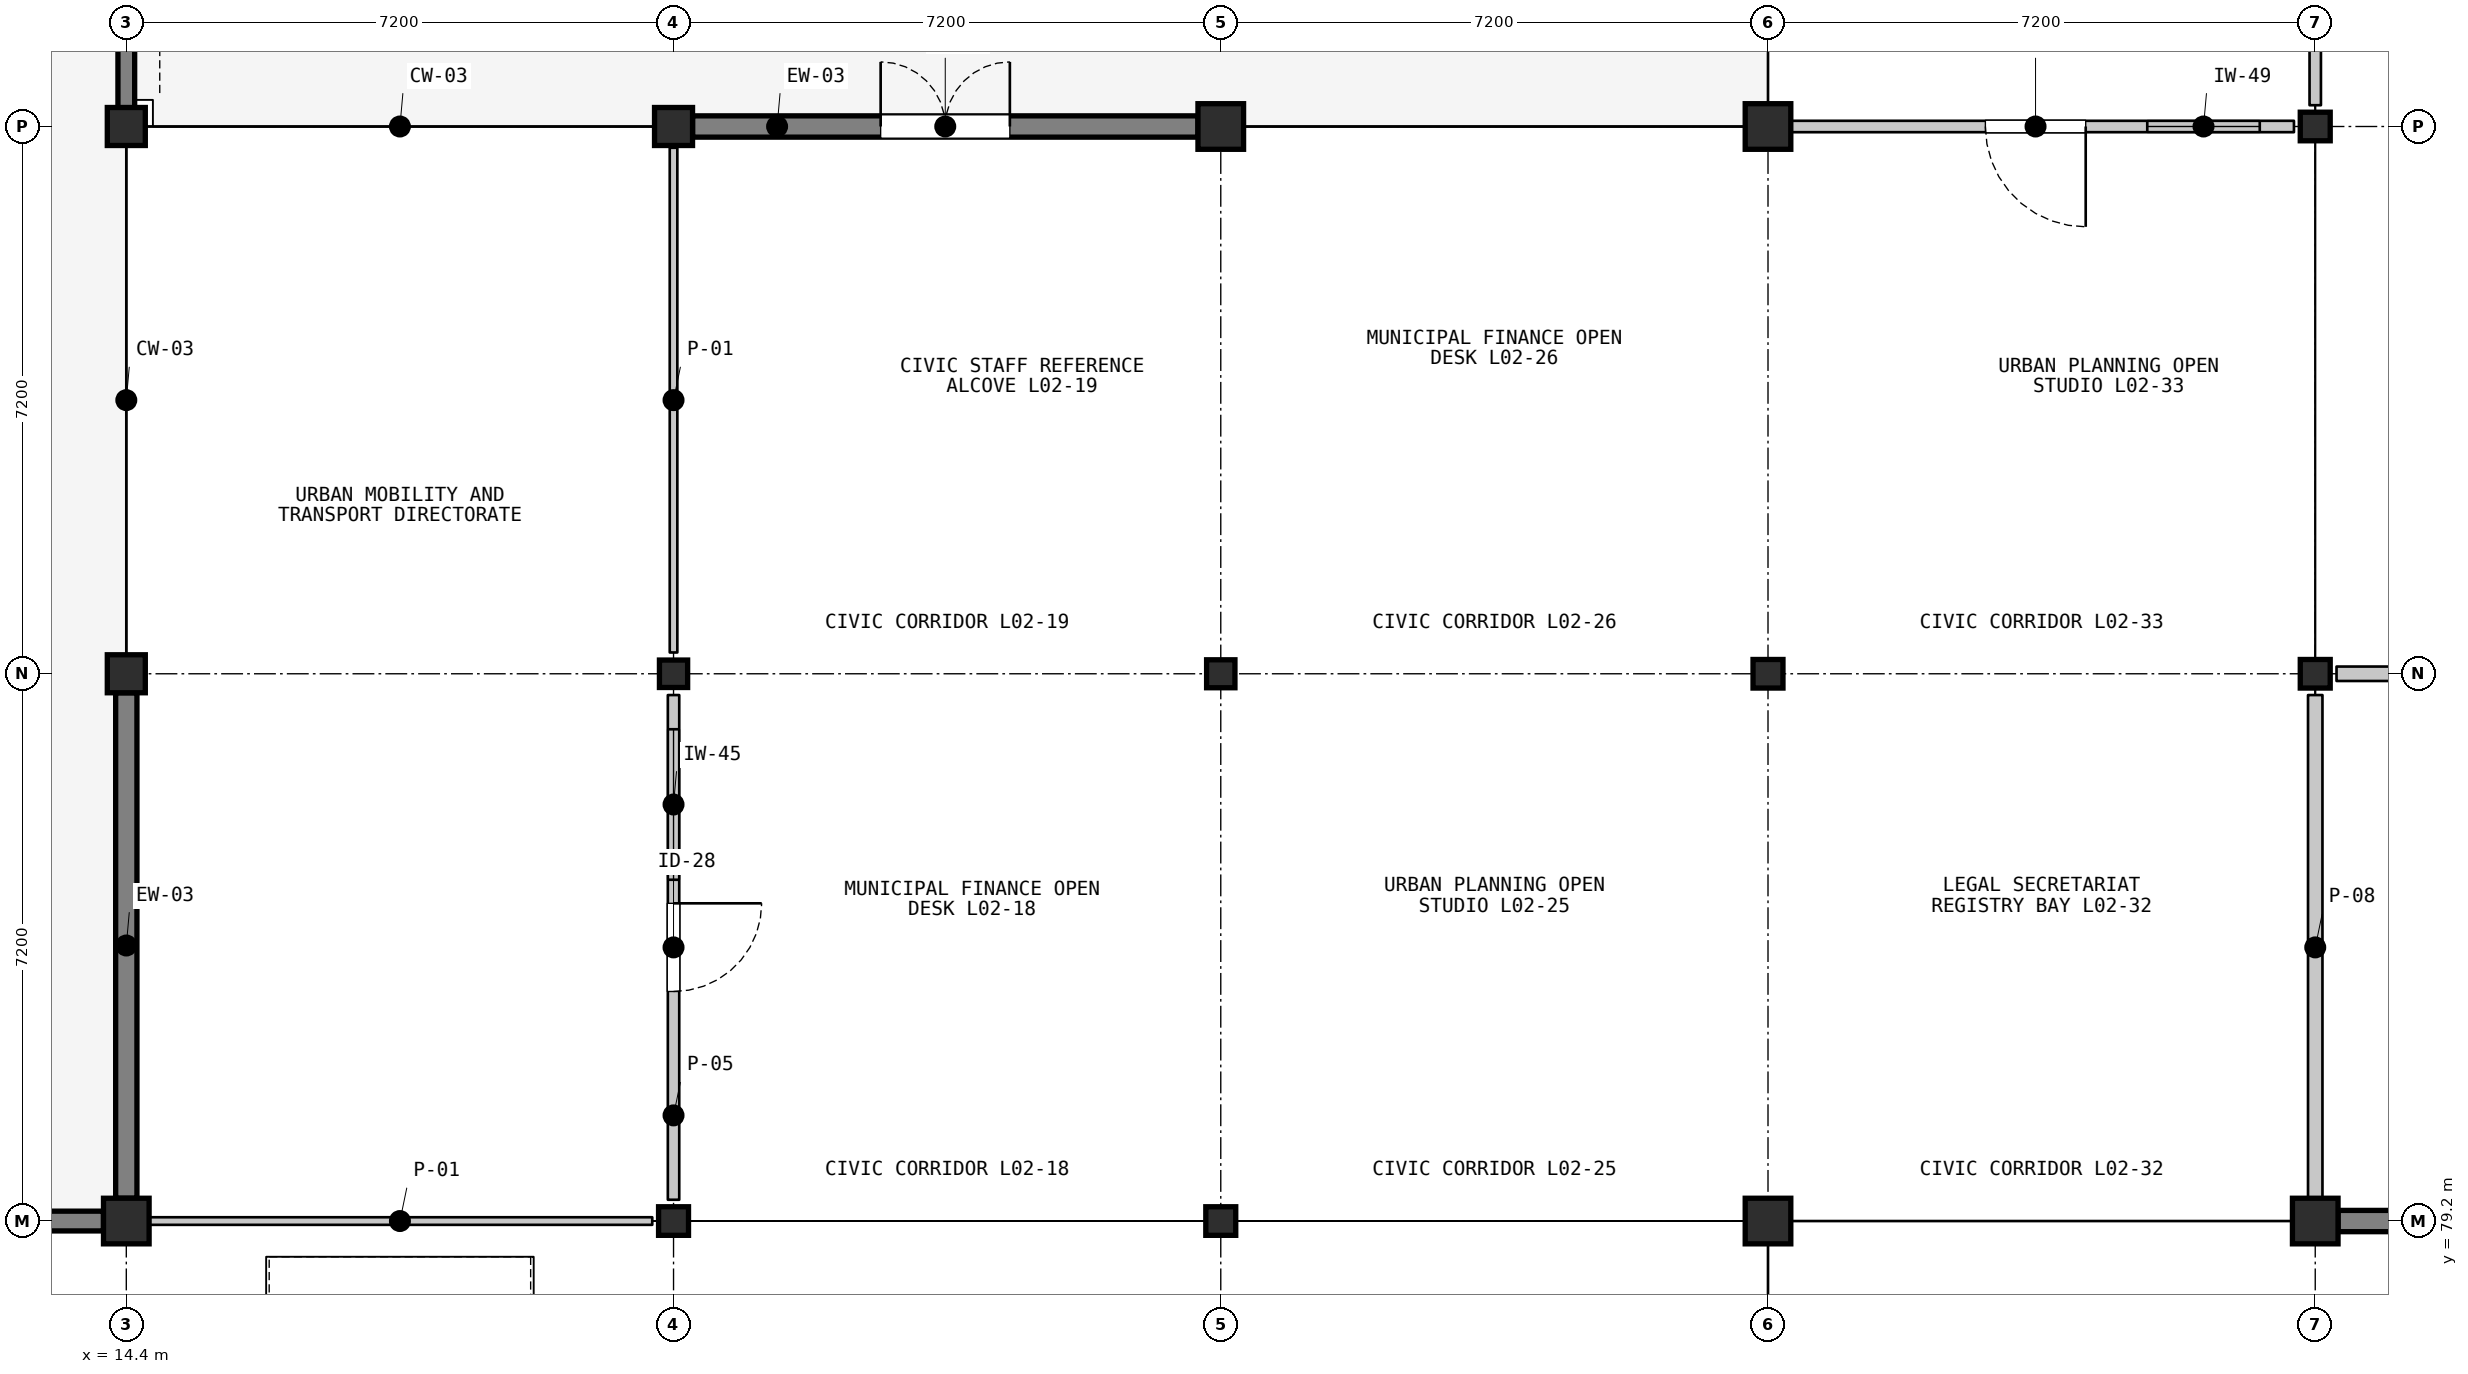
"""IFC4 building model, lengths in metres.
Left out: names, types, materials, properties, quantities, classifications, styles, units other than length and angle.
Written with IfcOpenShell. Run it as: python <this file> out.ifc"""

import sys

from ifc_helpers import new_model, si_unit, direction, frame, frame_2d, origin, origin_2d, place, context, subcontext, project, spatial, rectangle, i_section, extrude, element, fill, save


model = new_model("IFC4")
c1 = context("Model", 3, precision=1e-05, world=origin(), true_north=direction((0.0, 1.0)))
c2 = subcontext(c1, "Body", "Model", "MODEL_VIEW")
j1 = project(units=[si_unit("LENGTHUNIT", "METRE"), si_unit("PLANEANGLEUNIT", "RADIAN")], contexts=[c1])
p1 = place(None, origin())
s1 = spatial("IfcSite", under=j1, at=p1, CompositionType="ELEMENT")
p2 = place(p1, origin())
s2 = spatial("IfcBuilding", under=s1, at=p2, CompositionType="ELEMENT")
p3 = place(p2, frame((0.0, 0.0, 5.4)))
s3 = spatial("IfcBuildingStorey", under=s2, at=p3, CompositionType="ELEMENT", Elevation=5.4)
p4 = place(p3, frame((14.4, 79.2, 0.0), z_axis=(0.0, 0.0, 1.0), x_axis=(1.0, 0.0, 0.0)))
e1 = element("IfcColumn", 1, at=p4, inside=s3, PredefinedType="COLUMN", context=c2, shape_type="SweptSolid", body=[
    extrude(rectangle(XDim=0.6, YDim=0.6, at=origin_2d()), origin(), (0.0, 0.0, 1.0), 4.5),
])
for number, where, z_axis, x_axis in (
    (2, (14.4, 86.4, 0.0), (0.0, 0.0, 1.0), (1.0, 0.0, 0.0)),
    (3, (14.4, 93.6, 0.0), (0.0, 0.0, 1.0), (1.0, 0.0, 0.0)),
):
    element("IfcColumn", number, at=place(p3, frame(where, z_axis=z_axis, x_axis=x_axis)), inside=s3, PredefinedType="COLUMN", context=c2, shape_type="SweptSolid", body=[
        extrude(rectangle(XDim=0.5, YDim=0.5, at=origin_2d()), origin(), (0.0, 0.0, 1.0), 4.5),
    ])
p5 = place(p3, frame((21.6, 79.2, 0.0), z_axis=(0.0, 0.0, 1.0), x_axis=(1.0, 0.0, 0.0)))
e4 = element("IfcColumn", 4, at=p5, inside=s3, PredefinedType="COLUMN", context=c2, shape_type="SweptSolid", body=[
    extrude(i_section(OverallWidth=0.394, OverallDepth=0.376, WebThickness=0.017, FlangeThickness=0.028, FilletRadius=0.015, at=origin_2d()), origin(), (0.0, 0.0, 1.0), 4.5),
])
p6 = place(p3, frame((21.6, 86.4, 0.0), z_axis=(0.0, 0.0, 1.0), x_axis=(1.0, 0.0, 0.0)))
e5 = element("IfcColumn", 5, at=p6, inside=s3, PredefinedType="COLUMN", context=c2, shape_type="SweptSolid", body=[
    extrude(i_section(OverallWidth=0.371, OverallDepth=0.361, WebThickness=0.012, FlangeThickness=0.02, FilletRadius=0.015, at=origin_2d()), origin(), (0.0, 0.0, 1.0), 4.5),
])
p7 = place(p3, frame((21.6, 93.6, 0.0), z_axis=(0.0, 0.0, 1.0), x_axis=(1.0, 0.0, 0.0)))
e6 = element("IfcColumn", 6, at=p7, inside=s3, PredefinedType="COLUMN", context=c2, shape_type="SweptSolid", body=[
    extrude(rectangle(XDim=0.5, YDim=0.5, at=origin_2d()), origin(), (0.0, 0.0, 1.0), 4.5),
])
p8 = place(p3, frame((28.8, 79.2, 0.0), z_axis=(0.0, 0.0, 1.0), x_axis=(1.0, 0.0, 0.0)))
e7 = element("IfcColumn", 7, at=p8, inside=s3, PredefinedType="COLUMN", context=c2, shape_type="SweptSolid", body=[
    extrude(i_section(OverallWidth=0.394, OverallDepth=0.376, WebThickness=0.017, FlangeThickness=0.028, FilletRadius=0.015, at=origin_2d()), origin(), (0.0, 0.0, 1.0), 4.5),
])
p9 = place(p3, frame((28.8, 86.4, 0.0), z_axis=(0.0, 0.0, 1.0), x_axis=(1.0, 0.0, 0.0)))
e8 = element("IfcColumn", 8, at=p9, inside=s3, PredefinedType="COLUMN", context=c2, shape_type="SweptSolid", body=[
    extrude(i_section(OverallWidth=0.373, OverallDepth=0.368, WebThickness=0.015, FlangeThickness=0.024, FilletRadius=0.015, at=origin_2d()), origin(), (0.0, 0.0, 1.0), 4.5),
])
for number, where, z_axis, x_axis in (
    (9, (28.8, 93.6, 0.0), (0.0, 0.0, 1.0), (1.0, 0.0, 0.0)),
    (10, (36.0, 79.2, 0.0), (0.0, 0.0, 1.0), (1.0, 0.0, 0.0)),
):
    element("IfcColumn", number, at=place(p3, frame(where, z_axis=z_axis, x_axis=x_axis)), inside=s3, PredefinedType="COLUMN", context=c2, shape_type="SweptSolid", body=[
        extrude(rectangle(XDim=0.6, YDim=0.6, at=origin_2d()), origin(), (0.0, 0.0, 1.0), 4.5),
    ])
p10 = place(p3, frame((36.0, 86.4, 0.0), z_axis=(0.0, 0.0, 1.0), x_axis=(1.0, 0.0, 0.0)))
e11 = element("IfcColumn", 11, at=p10, inside=s3, PredefinedType="COLUMN", context=c2, shape_type="SweptSolid", body=[
    extrude(i_section(OverallWidth=0.394, OverallDepth=0.376, WebThickness=0.017, FlangeThickness=0.028, FilletRadius=0.015, at=origin_2d()), origin(), (0.0, 0.0, 1.0), 4.5),
])
for number, where, z_axis, x_axis in (
    (12, (36.0, 93.6, 0.0), (0.0, 0.0, 1.0), (1.0, 0.0, 0.0)),
    (13, (43.2, 79.2, 0.0), (0.0, 0.0, 1.0), (1.0, 0.0, 0.0)),
):
    element("IfcColumn", number, at=place(p3, frame(where, z_axis=z_axis, x_axis=x_axis)), inside=s3, PredefinedType="COLUMN", context=c2, shape_type="SweptSolid", body=[
        extrude(rectangle(XDim=0.6, YDim=0.6, at=origin_2d()), origin(), (0.0, 0.0, 1.0), 4.5),
    ])
for number, where, z_axis, x_axis in (
    (14, (43.2, 86.4, 0.0), (0.0, 0.0, 1.0), (1.0, 0.0, 0.0)),
    (15, (43.2, 93.6, 0.0), (0.0, 0.0, 1.0), (1.0, 0.0, 0.0)),
):
    element("IfcColumn", number, at=place(p3, frame(where, z_axis=z_axis, x_axis=x_axis)), inside=s3, PredefinedType="COLUMN", context=c2, shape_type="SweptSolid", body=[
        extrude(i_section(OverallWidth=0.394, OverallDepth=0.376, WebThickness=0.017, FlangeThickness=0.028, FilletRadius=0.015, at=origin_2d()), origin(), (0.0, 0.0, 1.0), 4.5),
    ])
p11 = place(p3, frame((7.5, 79.2, 0.0), z_axis=(0.0, 0.0, 1.0), x_axis=(1.0, 0.0, 0.0)))
e16 = element("IfcWall", 16, at=p11, inside=s3, PredefinedType="SOLIDWALL", context=c2, shape_type="SweptSolid", body=[
    extrude(rectangle(XDim=6.6, YDim=0.26, at=frame_2d((3.3, 0.0))), origin(), (0.0, 0.0, 1.0), 3.698),
])
p12 = place(p11, frame((0.934, 0.0, 0.95)))
e17 = element("IfcOpeningElement", 17, at=p12, cuts=e16, PredefinedType="OPENING", context=c2, shape_type="SweptSolid", body=[
    extrude(rectangle(XDim=1.3, YDim=2.0, at=frame_2d((0.65, 1.0))), frame((0.0, 0.14, 0.0), z_axis=(0.0, -1.0, 0.0), x_axis=(1.0, 0.0, 0.0)), (0.0, 0.0, 1.0), 0.28),
])
p13 = place(p11, frame((4.366, 0.0, 0.95)))
e18 = element("IfcOpeningElement", 18, at=p13, cuts=e16, PredefinedType="OPENING", context=c2, shape_type="SweptSolid", body=[
    extrude(rectangle(XDim=1.3, YDim=2.0, at=frame_2d((0.65, 1.0))), frame((0.0, 0.14, 0.0), z_axis=(0.0, -1.0, 0.0), x_axis=(1.0, 0.0, 0.0)), (0.0, 0.0, 1.0), 0.28),
])
p14 = place(p3, frame((14.4, 79.5, 0.0), z_axis=(0.0, 0.0, 1.0), x_axis=(0.0, 1.0, 0.0)))
e19 = element("IfcWall", 19, at=p14, inside=s3, PredefinedType="SOLIDWALL", context=c2, shape_type="SweptSolid", body=[
    extrude(rectangle(XDim=6.65, YDim=0.28, at=frame_2d((3.325, 0.0))), origin(), (0.0, 0.0, 1.0), 3.767),
])
p15 = place(p3, frame((21.85, 93.6, 0.0), z_axis=(0.0, 0.0, 1.0), x_axis=(1.0, 0.0, 0.0)))
e20 = element("IfcWall", 20, at=p15, inside=s3, PredefinedType="SOLIDWALL", context=c2, shape_type="SweptSolid", body=[
    extrude(rectangle(XDim=6.65, YDim=0.28, at=frame_2d((3.325, 0.0))), origin(), (0.0, 0.0, 1.0), 3.698),
])
p16 = place(p15, frame((2.475, 0.0, 0.0)))
e21 = element("IfcOpeningElement", 21, at=p16, cuts=e20, PredefinedType="OPENING", context=c2, shape_type="SweptSolid", body=[
    extrude(rectangle(XDim=1.7, YDim=2.25, at=frame_2d((0.85, 1.125))), frame((0.0, 0.15, 0.0), z_axis=(0.0, -1.0, 0.0), x_axis=(1.0, 0.0, 0.0)), (0.0, 0.0, 1.0), 0.3),
])
p17 = place(p3, frame((50.025, 79.2, 0.0), z_axis=(0.0, 0.0, 1.0), x_axis=(-1.0, 0.0, 0.0)))
e22 = element("IfcWall", 22, at=p17, inside=s3, PredefinedType="SOLIDWALL", context=c2, shape_type="SweptSolid", body=[
    extrude(rectangle(XDim=6.525, YDim=0.28, at=frame_2d((3.262, 0.0))), origin(), (0.0, 0.0, 1.0), 3.698),
])
p18 = place(p3, frame((14.4, 100.65, 0.0), z_axis=(0.0, 0.0, 1.0), x_axis=(0.0, -1.0, 0.0)))
e23 = element("IfcWall", 23, at=p18, inside=s3, PredefinedType="PARAPET", context=c2, shape_type="SweptSolid", body=[
    extrude(rectangle(XDim=6.9, YDim=0.22, at=frame_2d((3.45, 0.0))), origin(), (0.0, 0.0, 1.0), 0.85),
])
p19 = place(p3, frame((21.6, 86.12, 0.0), z_axis=(0.0, 0.0, 1.0), x_axis=(0.0, -1.0, 0.0)))
e24 = element("IfcWall", 24, at=p19, inside=s3, PredefinedType="PARTITIONING", context=c2, shape_type="SweptSolid", body=[
    extrude(rectangle(XDim=6.64, YDim=0.15, at=frame_2d((3.32, 0.0))), origin(), (0.0, 0.0, 1.0), 3.757),
])
p20 = place(p19, frame((2.74, 0.0, 0.0)))
e25 = element("IfcOpeningElement", 25, at=p20, cuts=e24, PredefinedType="OPENING", context=c2, shape_type="SweptSolid", body=[
    extrude(rectangle(XDim=1.16, YDim=2.2, at=frame_2d((0.58, 1.1))), frame((0.0, 0.085, 0.0), z_axis=(0.0, -1.0, 0.0), x_axis=(1.0, 0.0, 0.0)), (0.0, 0.0, 1.0), 0.17),
])
p21 = place(p19, frame((0.45, 0.0, 1.05)))
e26 = element("IfcOpeningElement", 26, at=p21, cuts=e24, PredefinedType="OPENING", context=c2, shape_type="SweptSolid", body=[
    extrude(rectangle(XDim=1.98, YDim=1.38, at=frame_2d((0.99, 0.69))), frame((0.0, 0.085, 0.0), z_axis=(0.0, -1.0, 0.0), x_axis=(1.0, 0.0, 0.0)), (0.0, 0.0, 1.0), 0.17),
])
p22 = place(p3, frame((21.6, 93.32, 0.0), z_axis=(0.0, 0.0, 1.0), x_axis=(0.0, -1.0, 0.0)))
e27 = element("IfcWall", 27, at=p22, inside=s3, PredefinedType="PARTITIONING", context=c2, shape_type="SweptSolid", body=[
    extrude(rectangle(XDim=6.64, YDim=0.1, at=frame_2d((3.32, 0.0))), origin(), (0.0, 0.0, 1.0), 3.757),
])
p23 = place(p3, frame((21.32, 79.2, 0.0), z_axis=(0.0, 0.0, 1.0), x_axis=(-1.0, 0.0, 0.0)))
e28 = element("IfcWall", 28, at=p23, inside=s3, PredefinedType="PARTITIONING", context=c2, shape_type="SweptSolid", body=[
    extrude(rectangle(XDim=6.64, YDim=0.1, at=frame_2d((3.32, 0.0))), origin(), (0.0, 0.0, 1.0), 3.688),
])
p24 = place(p3, frame((42.92, 93.6, 0.0), z_axis=(0.0, 0.0, 1.0), x_axis=(-1.0, 0.0, 0.0)))
e29 = element("IfcWall", 29, at=p24, inside=s3, PredefinedType="PARTITIONING", context=c2, shape_type="SweptSolid", body=[
    extrude(rectangle(XDim=6.8, YDim=0.15, at=frame_2d((3.4, 0.0))), origin(), (0.0, 0.0, 1.0), 3.688),
])
p25 = place(p24, frame((2.74, 0.0, 0.0)))
e30 = element("IfcOpeningElement", 30, at=p25, cuts=e29, PredefinedType="OPENING", context=c2, shape_type="SweptSolid", body=[
    extrude(rectangle(XDim=1.32, YDim=2.24, at=frame_2d((0.66, 1.12))), frame((0.0, 0.085, 0.0), z_axis=(0.0, -1.0, 0.0), x_axis=(1.0, 0.0, 0.0)), (0.0, 0.0, 1.0), 0.17),
])
p26 = place(p24, frame((0.45, 0.0, 1.05)))
e31 = element("IfcOpeningElement", 31, at=p26, cuts=e29, PredefinedType="OPENING", context=c2, shape_type="SweptSolid", body=[
    extrude(rectangle(XDim=1.48, YDim=1.48, at=frame_2d((0.74, 0.74))), frame((0.0, 0.085, 0.0), z_axis=(0.0, -1.0, 0.0), x_axis=(1.0, 0.0, 0.0)), (0.0, 0.0, 1.0), 0.17),
])
p27 = place(p3, frame((43.2, 100.68, 0.0), z_axis=(0.0, 0.0, 1.0), x_axis=(0.0, -1.0, 0.0)))
e32 = element("IfcWall", 32, at=p27, inside=s3, PredefinedType="PARTITIONING", context=c2, shape_type="SweptSolid", body=[
    extrude(rectangle(XDim=6.8, YDim=0.15, at=frame_2d((3.4, 0.0))), origin(), (0.0, 0.0, 1.0), 3.688),
])
p28 = place(p3, frame((43.48, 86.4, 0.0), z_axis=(0.0, 0.0, 1.0), x_axis=(1.0, 0.0, 0.0)))
e33 = element("IfcWall", 33, at=p28, inside=s3, PredefinedType="PARTITIONING", context=c2, shape_type="SweptSolid", body=[
    extrude(rectangle(XDim=6.8, YDim=0.19, at=frame_2d((3.4, 0.0))), origin(), (0.0, 0.0, 1.0), 3.688),
])
p29 = place(p28, frame((2.66, 0.0, 0.0)))
e34 = element("IfcOpeningElement", 34, at=p29, cuts=e33, PredefinedType="OPENING", context=c2, shape_type="SweptSolid", body=[
    extrude(rectangle(XDim=1.48, YDim=2.25, at=frame_2d((0.74, 1.125))), frame((0.0, 0.105, 0.0), z_axis=(0.0, -1.0, 0.0), x_axis=(1.0, 0.0, 0.0)), (0.0, 0.0, 1.0), 0.21),
])
p30 = place(p3, frame((43.2, 79.48, 0.0), z_axis=(0.0, 0.0, 1.0), x_axis=(0.0, 1.0, 0.0)))
e35 = element("IfcWall", 35, at=p30, inside=s3, PredefinedType="PARTITIONING", context=c2, shape_type="SweptSolid", body=[
    extrude(rectangle(XDim=6.64, YDim=0.19, at=frame_2d((3.32, 0.0))), origin(), (0.0, 0.0, 1.0), 3.757),
])
p31 = place(p16, origin())
e36 = element("IfcDoor", 36, at=p31, inside=s3, OperationType="DOUBLE_DOOR_SINGLE_SWING", PredefinedType="DOOR", context=c2, shape_type="SweptSolid", body=[
    extrude(rectangle(XDim=1.7, YDim=2.25, at=frame_2d((0.85, 1.125))), frame((0.0, 0.025, 0.0), z_axis=(0.0, -1.0, 0.0), x_axis=(1.0, 0.0, 0.0)), (0.0, 0.0, 1.0), 0.05),
])
fill(e21, e36)
p32 = place(p20, origin())
e37 = element("IfcDoor", 37, at=p32, inside=s3, OperationType="SINGLE_SWING_LEFT", PredefinedType="DOOR", context=c2, shape_type="SweptSolid", body=[
    extrude(rectangle(XDim=1.16, YDim=2.2, at=frame_2d((0.58, 1.1))), frame((0.0, 0.025, 0.0), z_axis=(0.0, -1.0, 0.0), x_axis=(1.0, 0.0, 0.0)), (0.0, 0.0, 1.0), 0.05),
])
fill(e25, e37)
p33 = place(p21, origin())
e38 = element("IfcWindow", 38, at=p33, inside=s3, PartitioningType="SINGLE_PANEL", PredefinedType="WINDOW", context=c2, shape_type="SweptSolid", body=[
    extrude(rectangle(XDim=1.98, YDim=1.38, at=frame_2d((0.99, 0.69))), frame((0.0, 0.03, 0.0), z_axis=(0.0, -1.0, 0.0), x_axis=(1.0, 0.0, 0.0)), (0.0, 0.0, 1.0), 0.06),
])
fill(e26, e38)
p34 = place(p25, origin())
e39 = element("IfcDoor", 39, at=p34, inside=s3, OperationType="SINGLE_SWING_LEFT", PredefinedType="DOOR", context=c2, shape_type="SweptSolid", body=[
    extrude(rectangle(XDim=1.32, YDim=2.24, at=frame_2d((0.66, 1.12))), frame((0.0, 0.025, 0.0), z_axis=(0.0, -1.0, 0.0), x_axis=(1.0, 0.0, 0.0)), (0.0, 0.0, 1.0), 0.05),
])
fill(e30, e39)
p35 = place(p26, origin())
e40 = element("IfcWindow", 40, at=p35, inside=s3, PartitioningType="SINGLE_PANEL", PredefinedType="WINDOW", context=c2, shape_type="SweptSolid", body=[
    extrude(rectangle(XDim=1.48, YDim=1.48, at=frame_2d((0.74, 0.74))), frame((0.0, 0.03, 0.0), z_axis=(0.0, -1.0, 0.0), x_axis=(1.0, 0.0, 0.0)), (0.0, 0.0, 1.0), 0.06),
])
fill(e31, e40)
save(model, sys.argv[1])
